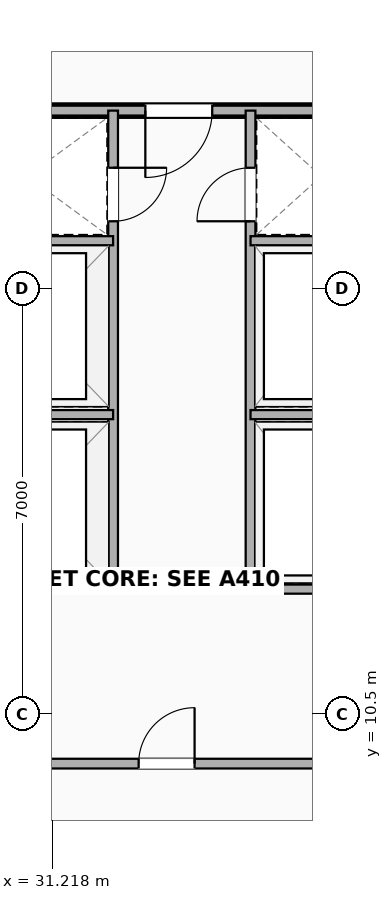
"""IFC4 building model, lengths in metres.
Left out: names, types, materials, properties, quantities, classifications, styles, units other than length and angle.
Written with IfcOpenShell. Run it as: python <this file> out.ifc"""

import sys

from ifc_helpers import new_model, si_unit, direction, frame, frame_2d, origin, place, context, subcontext, project, spatial, rectangle, extrude, element, fill, save


model = new_model("IFC4")
c1 = context("Model", 3, precision=1e-05, world=origin(), true_north=direction((0.0, 1.0)))
c2 = subcontext(c1, "Body", "Model", "MODEL_VIEW")
j1 = project(units=[si_unit("LENGTHUNIT", "METRE"), si_unit("PLANEANGLEUNIT", "RADIAN")], contexts=[c1])
p1 = place(None, origin())
s1 = spatial("IfcSite", under=j1, at=p1, CompositionType="ELEMENT")
p2 = place(p1, origin())
s2 = spatial("IfcBuilding", under=s1, at=p2, CompositionType="ELEMENT")
p3 = place(p2, frame((0.0, 0.0, 130.2)))
s3 = spatial("IfcBuildingStorey", under=s2, at=p3, CompositionType="ELEMENT", Elevation=130.2)
p4 = place(p3, frame((29.2, 20.42, 0.0), z_axis=(0.0, 0.0, 1.0), x_axis=(1.0, 0.0, 0.0)))
e1 = element("IfcWall", 1, at=p4, inside=s3, PredefinedType="PARTITIONING", context=c2, shape_type="SweptSolid", body=[
    extrude(rectangle(XDim=7.8, YDim=0.2, at=frame_2d((3.9, 0.0))), origin(), (0.0, 0.0, 1.0), 7.223),
])
p5 = place(p4, frame((3.55, 0.0, 0.0)))
e2 = element("IfcOpeningElement", 2, at=p5, cuts=e1, PredefinedType="OPENING", context=c2, shape_type="SweptSolid", body=[
    extrude(rectangle(XDim=1.1, YDim=2.15, at=frame_2d((0.55, 1.075))), frame((0.0, 0.11, 0.0), z_axis=(0.0, -1.0, 0.0), x_axis=(1.0, 0.0, 0.0)), (0.0, 0.0, 1.0), 0.22),
])
p6 = place(p3, frame((29.45, 9.68, 0.0), z_axis=(0.0, 0.0, 1.0), x_axis=(1.0, 0.0, 0.0)))
e3 = element("IfcWall", 3, at=p6, inside=s3, PredefinedType="PARTITIONING", context=c2, shape_type="SweptSolid", body=[
    extrude(rectangle(XDim=7.3, YDim=0.16, at=frame_2d((3.65, 0.0))), origin(), (0.0, 0.0, 1.0), 8.15),
])
p7 = place(p6, frame((4.11, 0.0, 0.0), z_axis=(0.0, 0.0, 1.0), x_axis=(-1.0, 0.0, 0.0)))
e4 = element("IfcOpeningElement", 4, at=p7, cuts=e3, PredefinedType="OPENING", context=c2, shape_type="SweptSolid", body=[
    extrude(rectangle(XDim=0.92, YDim=2.08, at=frame_2d((0.46, 1.04))), frame((0.0, 0.09, 0.0), z_axis=(0.0, -1.0, 0.0), x_axis=(1.0, 0.0, 0.0)), (0.0, 0.0, 1.0), 0.18),
])
p8 = place(p3, frame((32.22, 12.5, 0.0), z_axis=(0.0, 0.0, 1.0), x_axis=(0.0, 1.0, 0.0)))
e5 = element("IfcWall", 5, at=p8, inside=s3, PredefinedType="PARTITIONING", context=c2, shape_type="SweptSolid", body=[
    extrude(rectangle(XDim=7.92, YDim=0.16, at=frame_2d((3.96, 0.0))), origin(), (0.0, 0.0, 1.0), 7.524),
])
p9 = place(p8, frame((6.1, 0.0, 0.0)))
e6 = element("IfcOpeningElement", 6, at=p9, cuts=e5, PredefinedType="OPENING", context=c2, shape_type="SweptSolid", body=[
    extrude(rectangle(XDim=0.88, YDim=2.08, at=frame_2d((0.44, 1.04))), frame((0.0, 0.09, 0.0), z_axis=(0.0, -1.0, 0.0), x_axis=(1.0, 0.0, 0.0)), (0.0, 0.0, 1.0), 0.18),
])
p10 = place(p3, frame((34.48, 12.5, 0.0), z_axis=(0.0, 0.0, 1.0), x_axis=(0.0, 1.0, 0.0)))
e7 = element("IfcWall", 7, at=p10, inside=s3, PredefinedType="PARTITIONING", context=c2, shape_type="SweptSolid", body=[
    extrude(rectangle(XDim=7.92, YDim=0.16, at=frame_2d((3.96, 0.0))), origin(), (0.0, 0.0, 1.0), 7.524),
])
p11 = place(p10, frame((6.98, 0.0, 0.0), z_axis=(0.0, 0.0, 1.0), x_axis=(-1.0, 0.0, 0.0)))
e8 = element("IfcOpeningElement", 8, at=p11, cuts=e7, PredefinedType="OPENING", context=c2, shape_type="SweptSolid", body=[
    extrude(rectangle(XDim=0.88, YDim=2.08, at=frame_2d((0.44, 1.04))), frame((0.0, 0.09, 0.0), z_axis=(0.0, -1.0, 0.0), x_axis=(1.0, 0.0, 0.0)), (0.0, 0.0, 1.0), 0.18),
])
p12 = place(p3, frame((29.45, 12.55, 0.0), z_axis=(0.0, 0.0, 1.0), x_axis=(1.0, 0.0, 0.0)))
e9 = element("IfcWall", 9, at=p12, inside=s3, PredefinedType="PARTITIONING", context=c2, shape_type="SweptSolid", body=[
    extrude(rectangle(XDim=2.77, YDim=0.15, at=frame_2d((1.385, 0.0))), origin(), (0.0, 0.0, 1.0), 8.15),
])
p13 = place(p3, frame((34.48, 12.55, 0.0), z_axis=(0.0, 0.0, 1.0), x_axis=(1.0, 0.0, 0.0)))
e10 = element("IfcWall", 10, at=p13, inside=s3, PredefinedType="PARTITIONING", context=c2, shape_type="SweptSolid", body=[
    extrude(rectangle(XDim=2.27, YDim=0.15, at=frame_2d((1.135, 0.0))), origin(), (0.0, 0.0, 1.0), 8.15),
])
p14 = place(p3, frame((29.45, 15.42, 0.0), z_axis=(0.0, 0.0, 1.0), x_axis=(1.0, 0.0, 0.0)))
e11 = element("IfcWall", 11, at=p14, inside=s3, PredefinedType="PARTITIONING", context=c2, shape_type="SweptSolid", body=[
    extrude(rectangle(XDim=2.77, YDim=0.15, at=frame_2d((1.385, 0.0))), origin(), (0.0, 0.0, 1.0), 8.15),
])
p15 = place(p3, frame((34.48, 15.42, 0.0), z_axis=(0.0, 0.0, 1.0), x_axis=(1.0, 0.0, 0.0)))
e12 = element("IfcWall", 12, at=p15, inside=s3, PredefinedType="PARTITIONING", context=c2, shape_type="SweptSolid", body=[
    extrude(rectangle(XDim=2.27, YDim=0.15, at=frame_2d((1.135, 0.0))), origin(), (0.0, 0.0, 1.0), 8.15),
])
p16 = place(p3, frame((29.45, 18.28, 0.0), z_axis=(0.0, 0.0, 1.0), x_axis=(1.0, 0.0, 0.0)))
e13 = element("IfcWall", 13, at=p16, inside=s3, PredefinedType="PARTITIONING", context=c2, shape_type="SweptSolid", body=[
    extrude(rectangle(XDim=2.77, YDim=0.15, at=frame_2d((1.385, 0.0))), origin(), (0.0, 0.0, 1.0), 8.15),
])
p17 = place(p3, frame((34.48, 18.28, 0.0), z_axis=(0.0, 0.0, 1.0), x_axis=(1.0, 0.0, 0.0)))
e14 = element("IfcWall", 14, at=p17, inside=s3, PredefinedType="PARTITIONING", context=c2, shape_type="SweptSolid", body=[
    extrude(rectangle(XDim=2.27, YDim=0.15, at=frame_2d((1.135, 0.0))), origin(), (0.0, 0.0, 1.0), 8.15),
])
p18 = place(p5, origin())
e15 = element("IfcDoor", 15, at=p18, inside=s3, OperationType="SINGLE_SWING_LEFT", PredefinedType="DOOR", context=c2, shape_type="SweptSolid", body=[
    extrude(rectangle(XDim=1.1, YDim=2.15, at=frame_2d((0.55, 1.075))), frame((0.0, 0.025, 0.0), z_axis=(0.0, -1.0, 0.0), x_axis=(1.0, 0.0, 0.0)), (0.0, 0.0, 1.0), 0.05),
])
fill(e2, e15)
p19 = place(p7, origin())
e16 = element("IfcDoor", 16, at=p19, inside=s3, OperationType="SINGLE_SWING_RIGHT", PredefinedType="DOOR", context=c2, shape_type="SweptSolid", body=[
    extrude(rectangle(XDim=0.92, YDim=2.08, at=frame_2d((0.46, 1.04))), frame((0.0, 0.025, 0.0), z_axis=(0.0, -1.0, 0.0), x_axis=(1.0, 0.0, 0.0)), (0.0, 0.0, 1.0), 0.05),
])
fill(e4, e16)
p20 = place(p9, origin())
e17 = element("IfcDoor", 17, at=p20, inside=s3, OperationType="SINGLE_SWING_RIGHT", PredefinedType="DOOR", context=c2, shape_type="SweptSolid", body=[
    extrude(rectangle(XDim=0.88, YDim=2.08, at=frame_2d((0.44, 1.04))), frame((0.0, 0.025, 0.0), z_axis=(0.0, -1.0, 0.0), x_axis=(1.0, 0.0, 0.0)), (0.0, 0.0, 1.0), 0.05),
])
fill(e6, e17)
p21 = place(p11, origin())
e18 = element("IfcDoor", 18, at=p21, inside=s3, OperationType="SINGLE_SWING_LEFT", PredefinedType="DOOR", context=c2, shape_type="SweptSolid", body=[
    extrude(rectangle(XDim=0.88, YDim=2.08, at=frame_2d((0.44, 1.04))), frame((0.0, 0.025, 0.0), z_axis=(0.0, -1.0, 0.0), x_axis=(1.0, 0.0, 0.0)), (0.0, 0.0, 1.0), 0.05),
])
fill(e8, e18)
save(model, sys.argv[1])
